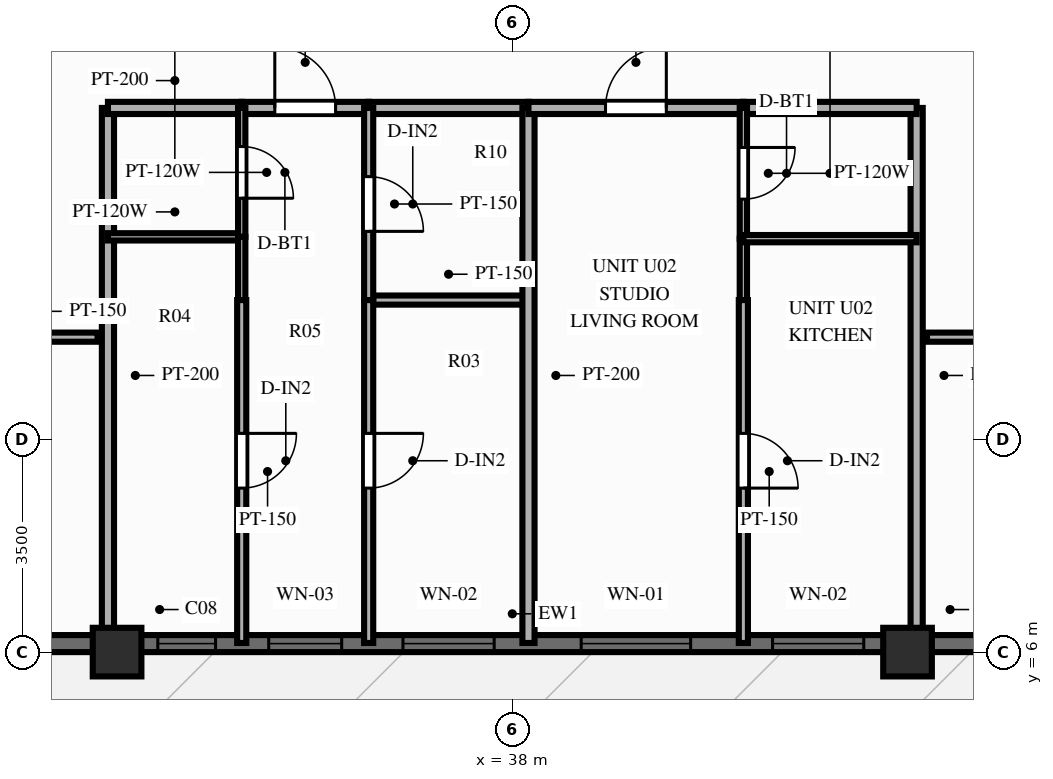
"""IFC4 building model, lengths in metres.
Left out: names, types, materials, properties, quantities, classifications, styles, units other than length and angle.
Written with IfcOpenShell. Run it as: python <this file> out.ifc"""

import sys

from ifc_helpers import new_model, si_unit, direction, frame, frame_2d, origin, origin_2d, place, context, subcontext, project, spatial, rectangle, extrude, source, transform, mapped, element, fill, save


model = new_model("IFC4")
c1 = context("Model", 3, precision=1e-05, world=origin(), true_north=direction((0.0, 1.0)))
c2 = subcontext(c1, "Body", "Model", "MODEL_VIEW")
j1 = project(units=[si_unit("LENGTHUNIT", "METRE"), si_unit("PLANEANGLEUNIT", "RADIAN")], contexts=[c1])
p1 = place(None, origin())
s1 = spatial("IfcSite", under=j1, at=p1, CompositionType="ELEMENT")
p2 = place(p1, origin())
s2 = spatial("IfcBuilding", under=s1, at=p2, CompositionType="ELEMENT")
p3 = place(p2, frame((0.0, 0.0, 182.8)))
s3 = spatial("IfcBuildingStorey", under=s2, at=p3, CompositionType="ELEMENT", Elevation=182.8)
m1 = source(origin(), c2, "Body", "SweptSolid", [
    extrude(rectangle(XDim=0.8, YDim=0.8, at=origin_2d()), origin(), (0.0, 0.0, 1.0), 3.9),
])
for number, where, z_axis, x_axis in (
    (1, (31.5, 6.0, 0.0), (0.0, 0.0, 1.0), (1.0, 0.0, 0.0)),
    (2, (44.5, 6.0, 0.0), (0.0, 0.0, 1.0), (1.0, 0.0, 0.0)),
):
    element("IfcColumn", number, at=place(p3, frame(where, z_axis=z_axis, x_axis=x_axis)), inside=s3, PredefinedType="COLUMN", context=c2, shape_type="MappedRepresentation", body=[
        mapped(m1, transform((0.0, 0.0, 0.0), scale=1.0)),
    ])
p4 = place(p3, frame((22.75, 6.14, 0.0), z_axis=(0.0, 0.0, 1.0), x_axis=(1.0, 0.0, 0.0)))
e3 = element("IfcWall", 3, at=p4, inside=s3, PredefinedType="SOLIDWALL", context=c2, shape_type="SweptSolid", body=[
    extrude(rectangle(XDim=30.5, YDim=0.28, at=frame_2d((15.25, 0.0))), origin(), (0.0, 0.0, 1.0), 2.79),
])
p5 = place(p4, frame((4.925, 0.0, 0.0), z_axis=(0.0, 0.0, 1.0), x_axis=(-1.0, 0.0, 0.0)))
e4 = element("IfcOpeningElement", 4, at=p5, cuts=e3, PredefinedType="OPENING", context=c2, shape_type="SweptSolid", body=[
    extrude(rectangle(XDim=1.1, YDim=2.15, at=frame_2d((0.55, 1.075))), frame((0.0, 0.152, 0.0), z_axis=(0.0, -1.0, 0.0), x_axis=(1.0, 0.0, 0.0)), (0.0, 0.0, 1.0), 0.304),
])
p6 = place(p4, frame((9.42, 0.0, 0.85)))
e5 = element("IfcOpeningElement", 5, at=p6, cuts=e3, PredefinedType="OPENING", context=c2, shape_type="SweptSolid", body=[
    extrude(rectangle(XDim=0.95, YDim=1.5, at=frame_2d((0.475, 0.75))), frame((0.0, 0.152, 0.0), z_axis=(0.0, -1.0, 0.0), x_axis=(1.0, 0.0, 0.0)), (0.0, 0.0, 1.0), 0.304),
])
p7 = place(p4, frame((11.244, 0.0, 0.85)))
e6 = element("IfcOpeningElement", 6, at=p7, cuts=e3, PredefinedType="OPENING", context=c2, shape_type="SweptSolid", body=[
    extrude(rectangle(XDim=1.2, YDim=1.5, at=frame_2d((0.6, 0.75))), frame((0.0, 0.152, 0.0), z_axis=(0.0, -1.0, 0.0), x_axis=(1.0, 0.0, 0.0)), (0.0, 0.0, 1.0), 0.304),
])
p8 = place(p4, frame((13.452, 0.0, 0.85)))
e7 = element("IfcOpeningElement", 7, at=p8, cuts=e3, PredefinedType="OPENING", context=c2, shape_type="SweptSolid", body=[
    extrude(rectangle(XDim=1.5, YDim=1.65, at=frame_2d((0.75, 0.825))), frame((0.0, 0.152, 0.0), z_axis=(0.0, -1.0, 0.0), x_axis=(1.0, 0.0, 0.0)), (0.0, 0.0, 1.0), 0.304),
])
p9 = place(p4, frame((16.383, 0.0, 0.85)))
e8 = element("IfcOpeningElement", 8, at=p9, cuts=e3, PredefinedType="OPENING", context=c2, shape_type="SweptSolid", body=[
    extrude(rectangle(XDim=1.8, YDim=1.65, at=frame_2d((0.9, 0.825))), frame((0.0, 0.152, 0.0), z_axis=(0.0, -1.0, 0.0), x_axis=(1.0, 0.0, 0.0)), (0.0, 0.0, 1.0), 0.304),
])
p10 = place(p4, frame((19.53, 0.0, 0.85)))
e9 = element("IfcOpeningElement", 9, at=p10, cuts=e3, PredefinedType="OPENING", context=c2, shape_type="SweptSolid", body=[
    extrude(rectangle(XDim=1.5, YDim=1.65, at=frame_2d((0.75, 0.825))), frame((0.0, 0.152, 0.0), z_axis=(0.0, -1.0, 0.0), x_axis=(1.0, 0.0, 0.0)), (0.0, 0.0, 1.0), 0.304),
])
p11 = place(p4, frame((25.225, 0.0, 0.85)))
e10 = element("IfcOpeningElement", 10, at=p11, cuts=e3, PredefinedType="OPENING", context=c2, shape_type="SweptSolid", body=[
    extrude(rectangle(XDim=1.8, YDim=1.65, at=frame_2d((0.9, 0.825))), frame((0.0, 0.152, 0.0), z_axis=(0.0, -1.0, 0.0), x_axis=(1.0, 0.0, 0.0)), (0.0, 0.0, 1.0), 0.304),
])
p12 = place(p3, frame((28.85, 11.18, 0.0), z_axis=(0.0, 0.0, 1.0), x_axis=(1.0, 0.0, 0.0)))
e11 = element("IfcWall", 11, at=p12, inside=s3, PredefinedType="PARTITIONING", context=c2, shape_type="SweptSolid", body=[
    extrude(rectangle(XDim=2.33, YDim=0.15, at=frame_2d((1.165, 0.0))), origin(), (0.0, 0.0, 1.0), 3.69),
])
p13 = place(p12, frame((0.55, 0.0, 0.0)))
e12 = element("IfcOpeningElement", 12, at=p13, cuts=e11, PredefinedType="OPENING", context=c2, shape_type="SweptSolid", body=[
    extrude(rectangle(XDim=0.9, YDim=2.1, at=frame_2d((0.45, 1.05))), frame((0.0, 0.087, 0.0), z_axis=(0.0, -1.0, 0.0), x_axis=(1.0, 0.0, 0.0)), (0.0, 0.0, 1.0), 0.174),
])
p14 = place(p3, frame((44.82, 11.18, 0.0), z_axis=(0.0, 0.0, 1.0), x_axis=(1.0, 0.0, 0.0)))
e13 = element("IfcWall", 13, at=p14, inside=s3, PredefinedType="PARTITIONING", context=c2, shape_type="SweptSolid", body=[
    extrude(rectangle(XDim=2.33, YDim=0.15, at=frame_2d((1.165, 0.0))), origin(), (0.0, 0.0, 1.0), 3.69),
])
p15 = place(p14, frame((0.88, 0.0, 0.0)))
e14 = element("IfcOpeningElement", 14, at=p15, cuts=e13, PredefinedType="OPENING", context=c2, shape_type="SweptSolid", body=[
    extrude(rectangle(XDim=0.9, YDim=2.1, at=frame_2d((0.45, 1.05))), frame((0.0, 0.087, 0.0), z_axis=(0.0, -1.0, 0.0), x_axis=(1.0, 0.0, 0.0)), (0.0, 0.0, 1.0), 0.174),
])
for number, where, z_axis, x_axis in (
    (15, (31.35, 14.95, 0.0), (0.0, 0.0, 1.0), (0.0, -1.0, 0.0)),
    (16, (44.65, 14.95, 0.0), (0.0, 0.0, 1.0), (0.0, -1.0, 0.0)),
):
    element("IfcWall", number, at=place(p3, frame(where, z_axis=z_axis, x_axis=x_axis)), inside=s3, PredefinedType="PARTITIONING", context=c2, shape_type="SweptSolid", body=[
        extrude(rectangle(XDim=8.8, YDim=0.2, at=frame_2d((4.4, 0.0))), origin(), (0.0, 0.0, 1.0), 2.79),
    ])
p16 = place(p3, frame((31.35, 14.95, 0.0), z_axis=(0.0, 0.0, 1.0), x_axis=(1.0, 0.0, 0.0)))
e17 = element("IfcWall", 17, at=p16, inside=s3, PredefinedType="PARTITIONING", context=c2, shape_type="SweptSolid", body=[
    extrude(rectangle(XDim=2.2, YDim=0.2, at=frame_2d((1.1, 0.0))), origin(), (0.0, 0.0, 1.0), 3.69),
])
p17 = place(p3, frame((33.55, 14.95, 0.0), z_axis=(0.0, 0.0, 1.0), x_axis=(1.0, 0.0, 0.0)))
e18 = element("IfcWall", 18, at=p17, inside=s3, PredefinedType="PARTITIONING", context=c2, shape_type="SweptSolid", body=[
    extrude(rectangle(XDim=2.088, YDim=0.2, at=frame_2d((1.044, 0.0))), origin(), (0.0, 0.0, 1.0), 3.69),
])
p18 = place(p17, frame((0.544, 0.0, 0.0)))
e19 = element("IfcOpeningElement", 19, at=p18, cuts=e18, PredefinedType="OPENING", context=c2, shape_type="SweptSolid", body=[
    extrude(rectangle(XDim=1.0, YDim=2.15, at=frame_2d((0.5, 1.075))), frame((0.0, 0.112, 0.0), z_axis=(0.0, -1.0, 0.0), x_axis=(1.0, 0.0, 0.0)), (0.0, 0.0, 1.0), 0.224),
])
p19 = place(p3, frame((35.638, 14.95, 0.0), z_axis=(0.0, 0.0, 1.0), x_axis=(1.0, 0.0, 0.0)))
e20 = element("IfcWall", 20, at=p19, inside=s3, PredefinedType="PARTITIONING", context=c2, shape_type="SweptSolid", body=[
    extrude(rectangle(XDim=2.628, YDim=0.2, at=frame_2d((1.314, 0.0))), origin(), (0.0, 0.0, 1.0), 3.69),
])
p20 = place(p3, frame((31.35, 12.83, 0.0), z_axis=(0.0, 0.0, 1.0), x_axis=(1.0, 0.0, 0.0)))
e21 = element("IfcWall", 21, at=p20, inside=s3, PredefinedType="PARTITIONING", context=c2, shape_type="SweptSolid", body=[
    extrude(rectangle(XDim=2.2, YDim=0.12, at=frame_2d((1.1, 0.0))), origin(), (0.0, 0.0, 1.0), 3.69),
])
p21 = place(p3, frame((35.638, 11.79, 0.0), z_axis=(0.0, 0.0, 1.0), x_axis=(1.0, 0.0, 0.0)))
e22 = element("IfcWall", 22, at=p21, inside=s3, PredefinedType="PARTITIONING", context=c2, shape_type="SweptSolid", body=[
    extrude(rectangle(XDim=2.628, YDim=0.15, at=frame_2d((1.314, 0.0))), origin(), (0.0, 0.0, 1.0), 3.39),
])
p22 = place(p3, frame((33.55, 14.95, 0.0), z_axis=(0.0, 0.0, 1.0), x_axis=(0.0, -1.0, 0.0)))
e23 = element("IfcWall", 23, at=p22, inside=s3, PredefinedType="PARTITIONING", context=c2, shape_type="SweptSolid", body=[
    extrude(rectangle(XDim=2.12, YDim=0.12, at=frame_2d((1.06, 0.0))), origin(), (0.0, 0.0, 1.0), 3.69),
])
p23 = place(p22, frame((0.635, 0.0, 0.0)))
e24 = element("IfcOpeningElement", 24, at=p23, cuts=e23, PredefinedType="OPENING", context=c2, shape_type="SweptSolid", body=[
    extrude(rectangle(XDim=0.85, YDim=2.05, at=frame_2d((0.425, 1.025))), frame((0.0, 0.072, 0.0), z_axis=(0.0, -1.0, 0.0), x_axis=(1.0, 0.0, 0.0)), (0.0, 0.0, 1.0), 0.144),
])
p24 = place(p3, frame((33.55, 12.83, 0.0), z_axis=(0.0, 0.0, 1.0), x_axis=(0.0, -1.0, 0.0)))
e25 = element("IfcWall", 25, at=p24, inside=s3, PredefinedType="PARTITIONING", context=c2, shape_type="SweptSolid", body=[
    extrude(rectangle(XDim=1.04, YDim=0.12, at=frame_2d((0.52, 0.0))), origin(), (0.0, 0.0, 1.0), 3.69),
])
p25 = place(p3, frame((33.55, 11.79, 0.0), z_axis=(0.0, 0.0, 1.0), x_axis=(0.0, -1.0, 0.0)))
e26 = element("IfcWall", 26, at=p25, inside=s3, PredefinedType="PARTITIONING", context=c2, shape_type="SweptSolid", body=[
    extrude(rectangle(XDim=5.64, YDim=0.15, at=frame_2d((2.82, 0.0))), origin(), (0.0, 0.0, 1.0), 3.69),
])
p26 = place(p25, frame((2.192, 0.0, 0.0)))
e27 = element("IfcOpeningElement", 27, at=p26, cuts=e26, PredefinedType="OPENING", context=c2, shape_type="SweptSolid", body=[
    extrude(rectangle(XDim=0.9, YDim=2.1, at=frame_2d((0.45, 1.05))), frame((0.0, 0.087, 0.0), z_axis=(0.0, -1.0, 0.0), x_axis=(1.0, 0.0, 0.0)), (0.0, 0.0, 1.0), 0.174),
])
p27 = place(p3, frame((35.638, 14.95, 0.0), z_axis=(0.0, 0.0, 1.0), x_axis=(0.0, -1.0, 0.0)))
e28 = element("IfcWall", 28, at=p27, inside=s3, PredefinedType="PARTITIONING", context=c2, shape_type="SweptSolid", body=[
    extrude(rectangle(XDim=3.16, YDim=0.15, at=frame_2d((1.58, 0.0))), origin(), (0.0, 0.0, 1.0), 3.69),
])
p28 = place(p27, frame((1.13, 0.0, 0.0)))
e29 = element("IfcOpeningElement", 29, at=p28, cuts=e28, PredefinedType="OPENING", context=c2, shape_type="SweptSolid", body=[
    extrude(rectangle(XDim=0.9, YDim=2.1, at=frame_2d((0.45, 1.05))), frame((0.0, 0.087, 0.0), z_axis=(0.0, -1.0, 0.0), x_axis=(1.0, 0.0, 0.0)), (0.0, 0.0, 1.0), 0.174),
])
p29 = place(p3, frame((35.638, 11.79, 0.0), z_axis=(0.0, 0.0, 1.0), x_axis=(0.0, -1.0, 0.0)))
e30 = element("IfcWall", 30, at=p29, inside=s3, PredefinedType="PARTITIONING", context=c2, shape_type="SweptSolid", body=[
    extrude(rectangle(XDim=5.64, YDim=0.15, at=frame_2d((2.82, 0.0))), origin(), (0.0, 0.0, 1.0), 3.69),
])
p30 = place(p29, frame((2.192, 0.0, 0.0)))
e31 = element("IfcOpeningElement", 31, at=p30, cuts=e30, PredefinedType="OPENING", context=c2, shape_type="SweptSolid", body=[
    extrude(rectangle(XDim=0.9, YDim=2.1, at=frame_2d((0.45, 1.05))), frame((0.0, 0.087, 0.0), z_axis=(0.0, -1.0, 0.0), x_axis=(1.0, 0.0, 0.0)), (0.0, 0.0, 1.0), 0.174),
])
p31 = place(p3, frame((38.266, 14.95, 0.0), z_axis=(0.0, 0.0, 1.0), x_axis=(0.0, -1.0, 0.0)))
e32 = element("IfcWall", 32, at=p31, inside=s3, PredefinedType="PARTITIONING", context=c2, shape_type="SweptSolid", body=[
    extrude(rectangle(XDim=8.8, YDim=0.2, at=frame_2d((4.4, 0.0))), origin(), (0.0, 0.0, 1.0), 3.69),
])
p32 = place(p3, frame((38.266, 14.95, 0.0), z_axis=(0.0, 0.0, 1.0), x_axis=(1.0, 0.0, 0.0)))
e33 = element("IfcWall", 33, at=p32, inside=s3, PredefinedType="PARTITIONING", context=c2, shape_type="SweptSolid", body=[
    extrude(rectangle(XDim=3.534, YDim=0.2, at=frame_2d((1.767, 0.0))), origin(), (0.0, 0.0, 1.0), 3.69),
])
p33 = place(p32, frame((1.267, 0.0, 0.0)))
e34 = element("IfcOpeningElement", 34, at=p33, cuts=e33, PredefinedType="OPENING", context=c2, shape_type="SweptSolid", body=[
    extrude(rectangle(XDim=1.0, YDim=2.15, at=frame_2d((0.5, 1.075))), frame((0.0, 0.112, 0.0), z_axis=(0.0, -1.0, 0.0), x_axis=(1.0, 0.0, 0.0)), (0.0, 0.0, 1.0), 0.224),
])
p34 = place(p3, frame((41.8, 14.95, 0.0), z_axis=(0.0, 0.0, 1.0), x_axis=(1.0, 0.0, 0.0)))
e35 = element("IfcWall", 35, at=p34, inside=s3, PredefinedType="PARTITIONING", context=c2, shape_type="SweptSolid", body=[
    extrude(rectangle(XDim=2.85, YDim=0.2, at=frame_2d((1.425, 0.0))), origin(), (0.0, 0.0, 1.0), 3.69),
])
p35 = place(p3, frame((41.8, 14.95, 0.0), z_axis=(0.0, 0.0, 1.0), x_axis=(0.0, -1.0, 0.0)))
e36 = element("IfcWall", 36, at=p35, inside=s3, PredefinedType="PARTITIONING", context=c2, shape_type="SweptSolid", body=[
    extrude(rectangle(XDim=2.15, YDim=0.12, at=frame_2d((1.075, 0.0))), origin(), (0.0, 0.0, 1.0), 3.69),
])
p36 = place(p35, frame((0.65, 0.0, 0.0)))
e37 = element("IfcOpeningElement", 37, at=p36, cuts=e36, PredefinedType="OPENING", context=c2, shape_type="SweptSolid", body=[
    extrude(rectangle(XDim=0.85, YDim=2.05, at=frame_2d((0.425, 1.025))), frame((0.0, 0.072, 0.0), z_axis=(0.0, -1.0, 0.0), x_axis=(1.0, 0.0, 0.0)), (0.0, 0.0, 1.0), 0.144),
])
p37 = place(p3, frame((41.8, 12.8, 0.0), z_axis=(0.0, 0.0, 1.0), x_axis=(0.0, -1.0, 0.0)))
e38 = element("IfcWall", 38, at=p37, inside=s3, PredefinedType="PARTITIONING", context=c2, shape_type="SweptSolid", body=[
    extrude(rectangle(XDim=1.01, YDim=0.12, at=frame_2d((0.505, 0.0))), origin(), (0.0, 0.0, 1.0), 3.69),
])
p38 = place(p3, frame((41.8, 12.8, 0.0), z_axis=(0.0, 0.0, 1.0), x_axis=(1.0, 0.0, 0.0)))
e39 = element("IfcWall", 39, at=p38, inside=s3, PredefinedType="PARTITIONING", context=c2, shape_type="SweptSolid", body=[
    extrude(rectangle(XDim=2.85, YDim=0.12, at=frame_2d((1.425, 0.0))), origin(), (0.0, 0.0, 1.0), 3.69),
])
p39 = place(p3, frame((41.8, 11.79, 0.0), z_axis=(0.0, 0.0, 1.0), x_axis=(0.0, -1.0, 0.0)))
e40 = element("IfcWall", 40, at=p39, inside=s3, PredefinedType="PARTITIONING", context=c2, shape_type="SweptSolid", body=[
    extrude(rectangle(XDim=5.64, YDim=0.15, at=frame_2d((2.82, 0.0))), origin(), (0.0, 0.0, 1.0), 3.69),
])
p40 = place(p39, frame((2.192, 0.0, 0.0)))
e41 = element("IfcOpeningElement", 41, at=p40, cuts=e40, PredefinedType="OPENING", context=c2, shape_type="SweptSolid", body=[
    extrude(rectangle(XDim=0.9, YDim=2.1, at=frame_2d((0.45, 1.05))), frame((0.0, 0.087, 0.0), z_axis=(0.0, -1.0, 0.0), x_axis=(1.0, 0.0, 0.0)), (0.0, 0.0, 1.0), 0.174),
])
m2 = source(origin(), c2, "Body", "SweptSolid", [
    extrude(rectangle(XDim=0.95, YDim=1.5, at=frame_2d((0.475, 0.75))), frame((0.0, 0.03, 0.0), z_axis=(0.0, -1.0, 0.0), x_axis=(1.0, 0.0, 0.0)), (0.0, 0.0, 1.0), 0.06),
])
p41 = place(p6, origin())
e42 = element("IfcWindow", 42, at=p41, inside=s3, PartitioningType="SINGLE_PANEL", PredefinedType="WINDOW", context=c2, shape_type="MappedRepresentation", body=[
    mapped(m2, transform((0.0, 0.0, 0.0), scale=1.0)),
])
fill(e5, e42)
m3 = source(origin(), c2, "Body", "SweptSolid", [
    extrude(rectangle(XDim=1.2, YDim=1.5, at=frame_2d((0.6, 0.75))), frame((0.0, 0.03, 0.0), z_axis=(0.0, -1.0, 0.0), x_axis=(1.0, 0.0, 0.0)), (0.0, 0.0, 1.0), 0.06),
])
p42 = place(p7, origin())
e43 = element("IfcWindow", 43, at=p42, inside=s3, PartitioningType="SINGLE_PANEL", PredefinedType="WINDOW", context=c2, shape_type="MappedRepresentation", body=[
    mapped(m3, transform((0.0, 0.0, 0.0), scale=1.0)),
])
fill(e6, e43)
m4 = source(origin(), c2, "Body", "SweptSolid", [
    extrude(rectangle(XDim=1.5, YDim=1.65, at=frame_2d((0.75, 0.825))), frame((0.0, 0.03, 0.0), z_axis=(0.0, -1.0, 0.0), x_axis=(1.0, 0.0, 0.0)), (0.0, 0.0, 1.0), 0.06),
])
p43 = place(p8, origin())
e44 = element("IfcWindow", 44, at=p43, inside=s3, PartitioningType="SINGLE_PANEL", PredefinedType="WINDOW", context=c2, shape_type="MappedRepresentation", body=[
    mapped(m4, transform((0.0, 0.0, 0.0), scale=1.0)),
])
fill(e7, e44)
m5 = source(origin(), c2, "Body", "SweptSolid", [
    extrude(rectangle(XDim=1.8, YDim=1.65, at=frame_2d((0.9, 0.825))), frame((0.0, 0.03, 0.0), z_axis=(0.0, -1.0, 0.0), x_axis=(1.0, 0.0, 0.0)), (0.0, 0.0, 1.0), 0.06),
])
p44 = place(p9, origin())
e45 = element("IfcWindow", 45, at=p44, inside=s3, PartitioningType="SINGLE_PANEL", PredefinedType="WINDOW", context=c2, shape_type="MappedRepresentation", body=[
    mapped(m5, transform((0.0, 0.0, 0.0), scale=1.0)),
])
fill(e8, e45)
p45 = place(p10, origin())
e46 = element("IfcWindow", 46, at=p45, inside=s3, PartitioningType="SINGLE_PANEL", PredefinedType="WINDOW", context=c2, shape_type="MappedRepresentation", body=[
    mapped(m4, transform((0.0, 0.0, 0.0), scale=1.0)),
])
fill(e9, e46)
m6 = source(origin(), c2, "Body", "SweptSolid", [
    extrude(rectangle(XDim=1.0, YDim=2.15, at=frame_2d((0.5, 1.075))), frame((0.0, 0.025, 0.0), z_axis=(0.0, -1.0, 0.0), x_axis=(1.0, 0.0, 0.0)), (0.0, 0.0, 1.0), 0.05),
])
p46 = place(p18, origin())
e47 = element("IfcDoor", 47, at=p46, inside=s3, OperationType="SINGLE_SWING_LEFT", PredefinedType="DOOR", context=c2, shape_type="MappedRepresentation", body=[
    mapped(m6, transform((0.0, 0.0, 0.0), scale=1.0)),
])
fill(e19, e47)
m7 = source(origin(), c2, "Body", "SweptSolid", [
    extrude(rectangle(XDim=0.85, YDim=2.05, at=frame_2d((0.425, 1.025))), frame((0.0, 0.025, 0.0), z_axis=(0.0, -1.0, 0.0), x_axis=(1.0, 0.0, 0.0)), (0.0, 0.0, 1.0), 0.05),
])
p47 = place(p23, origin())
e48 = element("IfcDoor", 48, at=p47, inside=s3, OperationType="SINGLE_SWING_RIGHT", PredefinedType="DOOR", context=c2, shape_type="MappedRepresentation", body=[
    mapped(m7, transform((0.0, 0.0, 0.0), scale=1.0)),
])
fill(e24, e48)
m8 = source(origin(), c2, "Body", "SweptSolid", [
    extrude(rectangle(XDim=0.9, YDim=2.1, at=frame_2d((0.45, 1.05))), frame((0.0, 0.025, 0.0), z_axis=(0.0, -1.0, 0.0), x_axis=(1.0, 0.0, 0.0)), (0.0, 0.0, 1.0), 0.05),
])
p48 = place(p26, origin())
e49 = element("IfcDoor", 49, at=p48, inside=s3, OperationType="SINGLE_SWING_LEFT", PredefinedType="DOOR", context=c2, shape_type="MappedRepresentation", body=[
    mapped(m8, transform((0.0, 0.0, 0.0), scale=1.0)),
])
fill(e27, e49)
p49 = place(p28, origin())
e50 = element("IfcDoor", 50, at=p49, inside=s3, OperationType="SINGLE_SWING_RIGHT", PredefinedType="DOOR", context=c2, shape_type="MappedRepresentation", body=[
    mapped(m8, transform((0.0, 0.0, 0.0), scale=1.0)),
])
fill(e29, e50)
p50 = place(p30, origin())
e51 = element("IfcDoor", 51, at=p50, inside=s3, OperationType="SINGLE_SWING_LEFT", PredefinedType="DOOR", context=c2, shape_type="MappedRepresentation", body=[
    mapped(m8, transform((0.0, 0.0, 0.0), scale=1.0)),
])
fill(e31, e51)
p51 = place(p33, origin())
e52 = element("IfcDoor", 52, at=p51, inside=s3, OperationType="SINGLE_SWING_RIGHT", PredefinedType="DOOR", context=c2, shape_type="MappedRepresentation", body=[
    mapped(m6, transform((0.0, 0.0, 0.0), scale=1.0)),
])
fill(e34, e52)
p52 = place(p36, origin())
e53 = element("IfcDoor", 53, at=p52, inside=s3, OperationType="SINGLE_SWING_LEFT", PredefinedType="DOOR", context=c2, shape_type="MappedRepresentation", body=[
    mapped(m7, transform((0.0, 0.0, 0.0), scale=1.0)),
])
fill(e37, e53)
p53 = place(p40, origin())
e54 = element("IfcDoor", 54, at=p53, inside=s3, OperationType="SINGLE_SWING_RIGHT", PredefinedType="DOOR", context=c2, shape_type="MappedRepresentation", body=[
    mapped(m8, transform((0.0, 0.0, 0.0), scale=1.0)),
])
fill(e41, e54)
save(model, sys.argv[1])
